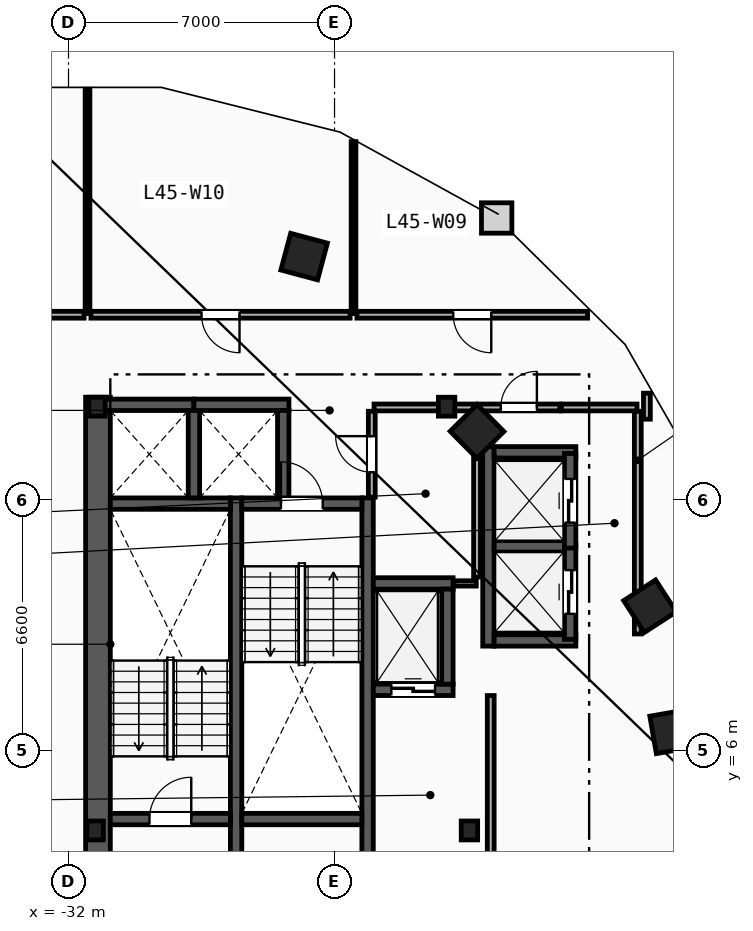
"""IFC4 building model, lengths in metres.
Left out: names, types, materials, properties, quantities, classifications, styles, units other than length and angle.
Written with IfcOpenShell. Run it as: python <this file> out.ifc"""

import sys

from ifc_helpers import new_model, si_unit, direction, frame, frame_2d, origin, origin_2d, place, context, subcontext, project, spatial, rectangle, i_section, extrude, element, fill, save


model = new_model("IFC4")
c1 = context("Model", 3, precision=1e-05, world=origin(), true_north=direction((0.0, 1.0)))
c2 = subcontext(c1, "Body", "Model", "MODEL_VIEW")
j1 = project(units=[si_unit("LENGTHUNIT", "METRE"), si_unit("PLANEANGLEUNIT", "RADIAN")], contexts=[c1])
p1 = place(None, origin())
s1 = spatial("IfcSite", under=j1, at=p1, CompositionType="ELEMENT")
p2 = place(p1, origin())
s2 = spatial("IfcBuilding", under=s1, at=p2, CompositionType="ELEMENT")
p3 = place(p2, frame((0.0, 0.0, 172.8)))
s3 = spatial("IfcBuildingStorey", under=s2, at=p3, CompositionType="ELEMENT", Elevation=172.8)
for number, where, z_axis, x_axis in (
    (1, (-31.3, 3.9, 0.0), (0.0, 0.0, 1.0), (1.0, 0.0, 0.0)),
    (2, (-21.45, 3.9, 0.0), (0.0, 0.0, 1.0), (1.0, 0.0, 0.0)),
    (3, (-22.05, 15.05, 0.0), (0.0, 0.0, 1.0), (1.0, 0.0, 0.0)),
    (4, (-31.25, 15.05, 0.0), (0.0, 0.0, 1.0), (1.0, 0.0, 0.0)),
):
    element("IfcColumn", number, at=place(p3, frame(where, z_axis=z_axis, x_axis=x_axis)), inside=s3, PredefinedType="COLUMN", context=c2, shape_type="SweptSolid", body=[
        extrude(i_section(OverallWidth=0.432, OverallDepth=0.498, WebThickness=0.056, FlangeThickness=0.089, FilletRadius=0.018, at=origin_2d()), origin(), (0.0, 0.0, 1.0), 3.6),
    ])
for number, where, z_axis, x_axis in (
    (5, (-15.55, 3.2, 0.0), (0.0, 0.0, 1.0), (0.315, 0.949, 0.0)),
    (6, (-16.125, 6.5, 0.0), (0.0, 0.0, 1.0), (-0.172, 0.985, 0.0)),
    (7, (-16.7, 9.8, 0.0), (0.0, 0.0, 1.0), (-0.544, 0.839, 0.0)),
    (8, (-21.25, 14.4, 0.0), (0.0, 0.0, 1.0), (-0.703, 0.711, 0.0)),
    (9, (-25.8, 19.0, 0.0), (0.0, 0.0, 1.0), (-0.966, 0.259, 0.0)),
):
    element("IfcColumn", number, at=place(p3, frame(where, z_axis=z_axis, x_axis=x_axis)), inside=s3, PredefinedType="COLUMN", context=c2, shape_type="SweptSolid", body=[
        extrude(rectangle(XDim=1.0, YDim=1.0, at=origin_2d()), origin(), (0.0, 0.0, 1.0), 3.6),
    ])
p4 = place(p3, frame((-31.225, 1.97, 0.0), z_axis=(0.0, 0.0, 1.0), x_axis=(0.0, 1.0, 0.0)))
e10 = element("IfcWall", 10, at=p4, inside=s3, PredefinedType="SHEAR", context=c2, shape_type="SweptSolid", body=[
    extrude(rectangle(XDim=13.33, YDim=0.65, at=frame_2d((6.665, 0.0))), origin(), (0.0, 0.0, 1.0), 3.36),
])
for number, where, z_axis, x_axis in (
    (11, (-27.59, 1.97, 0.0), (0.0, 0.0, 1.0), (0.0, 1.0, 0.0)),
    (12, (-24.13, 1.97, 0.0), (0.0, 0.0, 1.0), (0.0, 1.0, 0.0)),
):
    element("IfcWall", number, at=place(p3, frame(where, z_axis=z_axis, x_axis=x_axis)), inside=s3, PredefinedType="SHEAR", context=c2, shape_type="SweptSolid", body=[
        extrude(rectangle(XDim=10.68, YDim=0.3, at=frame_2d((5.34, 0.0))), origin(), (0.0, 0.0, 1.0), 3.36),
    ])
p5 = place(p3, frame((-30.9, 4.2, 0.0), z_axis=(0.0, 0.0, 1.0), x_axis=(1.0, 0.0, 0.0)))
e13 = element("IfcWall", 13, at=p5, inside=s3, PredefinedType="SHEAR", context=c2, shape_type="SweptSolid", body=[
    extrude(rectangle(XDim=3.16, YDim=0.3, at=frame_2d((1.58, 0.0))), origin(), (0.0, 0.0, 1.0), 3.36),
])
p6 = place(p5, frame((1.03, 0.0, 0.0)))
e14 = element("IfcOpeningElement", 14, at=p6, cuts=e13, PredefinedType="OPENING", context=c2, shape_type="SweptSolid", body=[
    extrude(rectangle(XDim=1.1, YDim=2.15, at=frame_2d((0.55, 1.075))), frame((0.0, 0.16, 0.0), z_axis=(0.0, -1.0, 0.0), x_axis=(1.0, 0.0, 0.0)), (0.0, 0.0, 1.0), 0.32),
])
p7 = place(p3, frame((-30.9, 12.5, 0.0), z_axis=(0.0, 0.0, 1.0), x_axis=(1.0, 0.0, 0.0)))
e15 = element("IfcWall", 15, at=p7, inside=s3, PredefinedType="SHEAR", context=c2, shape_type="SweptSolid", body=[
    extrude(rectangle(XDim=3.16, YDim=0.3, at=frame_2d((1.58, 0.0))), origin(), (0.0, 0.0, 1.0), 3.36),
])
p8 = place(p3, frame((-27.44, 12.5, 0.0), z_axis=(0.0, 0.0, 1.0), x_axis=(1.0, 0.0, 0.0)))
e16 = element("IfcWall", 16, at=p8, inside=s3, PredefinedType="SHEAR", context=c2, shape_type="SweptSolid", body=[
    extrude(rectangle(XDim=3.16, YDim=0.3, at=frame_2d((1.58, 0.0))), origin(), (0.0, 0.0, 1.0), 3.36),
])
p9 = place(p8, frame((1.03, 0.0, 0.0)))
e17 = element("IfcOpeningElement", 17, at=p9, cuts=e16, PredefinedType="OPENING", context=c2, shape_type="SweptSolid", body=[
    extrude(rectangle(XDim=1.1, YDim=2.15, at=frame_2d((0.55, 1.075))), frame((0.0, 0.16, 0.0), z_axis=(0.0, -1.0, 0.0), x_axis=(1.0, 0.0, 0.0)), (0.0, 0.0, 1.0), 0.32),
])
p10 = place(p3, frame((-27.44, 4.2, 0.0), z_axis=(0.0, 0.0, 1.0), x_axis=(1.0, 0.0, 0.0)))
e18 = element("IfcWall", 18, at=p10, inside=s3, PredefinedType="SHEAR", context=c2, shape_type="SweptSolid", body=[
    extrude(rectangle(XDim=3.16, YDim=0.3, at=frame_2d((1.58, 0.0))), origin(), (0.0, 0.0, 1.0), 3.36),
])
p11 = place(p3, frame((-20.89, 2.15, 0.0), z_axis=(0.0, 0.0, 1.0), x_axis=(0.0, 1.0, 0.0)))
e19 = element("IfcWall", 19, at=p11, inside=s3, PredefinedType="PARTITIONING", context=c2, shape_type="SweptSolid", body=[
    extrude(rectangle(XDim=5.3, YDim=0.18, at=frame_2d((2.65, 0.0))), origin(), (0.0, 0.0, 1.0), 3.36),
])
p12 = place(p3, frame((-23.98, 7.6, 0.0), z_axis=(0.0, 0.0, 1.0), x_axis=(1.0, 0.0, 0.0)))
e20 = element("IfcWall", 20, at=p12, inside=s3, PredefinedType="SHEAR", context=c2, shape_type="SweptSolid", body=[
    extrude(rectangle(XDim=2.1, YDim=0.3, at=frame_2d((1.05, 0.0))), origin(), (0.0, 0.0, 1.0), 3.36),
])
p13 = place(p12, frame((0.475, 0.0, 0.0)))
e21 = element("IfcOpeningElement", 21, at=p13, cuts=e20, PredefinedType="OPENING", context=c2, shape_type="SweptSolid", body=[
    extrude(rectangle(XDim=1.15, YDim=2.2, at=frame_2d((0.575, 1.1))), frame((0.0, 0.16, 0.0), z_axis=(0.0, -1.0, 0.0), x_axis=(1.0, 0.0, 0.0)), (0.0, 0.0, 1.0), 0.32),
])
p14 = place(p3, frame((-23.98, 10.4, 0.0), z_axis=(0.0, 0.0, 1.0), x_axis=(1.0, 0.0, 0.0)))
e22 = element("IfcWall", 22, at=p14, inside=s3, PredefinedType="SHEAR", context=c2, shape_type="SweptSolid", body=[
    extrude(rectangle(XDim=2.1, YDim=0.3, at=frame_2d((1.05, 0.0))), origin(), (0.0, 0.0, 1.0), 3.36),
])
for number, where, z_axis, x_axis in (
    (23, (-22.03, 7.75, 0.0), (0.0, 0.0, 1.0), (0.0, 1.0, 0.0)),
    (24, (-31.2, 15.1, 0.0), (0.0, 0.0, 1.0), (1.0, 0.0, 0.0)),
):
    element("IfcWall", number, at=place(p3, frame(where, z_axis=z_axis, x_axis=x_axis)), inside=s3, PredefinedType="SHEAR", context=c2, shape_type="SweptSolid", body=[
        extrude(rectangle(XDim=2.5, YDim=0.3, at=frame_2d((1.25, 0.0))), origin(), (0.0, 0.0, 1.0), 3.36),
    ])
p15 = place(p3, frame((-28.7, 12.65, 0.0), z_axis=(0.0, 0.0, 1.0), x_axis=(0.0, 1.0, 0.0)))
e25 = element("IfcWall", 25, at=p15, inside=s3, PredefinedType="SHEAR", context=c2, shape_type="SweptSolid", body=[
    extrude(rectangle(XDim=2.3, YDim=0.3, at=frame_2d((1.15, 0.0))), origin(), (0.0, 0.0, 1.0), 3.36),
])
p16 = place(p3, frame((-28.7, 15.1, 0.0), z_axis=(0.0, 0.0, 1.0), x_axis=(1.0, 0.0, 0.0)))
e26 = element("IfcWall", 26, at=p16, inside=s3, PredefinedType="SHEAR", context=c2, shape_type="SweptSolid", body=[
    extrude(rectangle(XDim=2.5, YDim=0.3, at=frame_2d((1.25, 0.0))), origin(), (0.0, 0.0, 1.0), 3.36),
])
p17 = place(p3, frame((-26.35, 12.65, 0.0), z_axis=(0.0, 0.0, 1.0), x_axis=(0.0, 1.0, 0.0)))
e27 = element("IfcWall", 27, at=p17, inside=s3, PredefinedType="SHEAR", context=c2, shape_type="SweptSolid", body=[
    extrude(rectangle(XDim=2.3, YDim=0.3, at=frame_2d((1.15, 0.0))), origin(), (0.0, 0.0, 1.0), 3.36),
])
p18 = place(p3, frame((-20.95, 8.75, 0.0), z_axis=(0.0, 0.0, 1.0), x_axis=(0.0, 1.0, 0.0)))
e28 = element("IfcWall", 28, at=p18, inside=s3, PredefinedType="SHEAR", context=c2, shape_type="SweptSolid", body=[
    extrude(rectangle(XDim=5.25, YDim=0.3, at=frame_2d((2.625, 0.0))), origin(), (0.0, 0.0, 1.0), 3.36),
])
for number, where, z_axis, x_axis in (
    (29, (-20.8, 8.9, 0.0), (0.0, 0.0, 1.0), (1.0, 0.0, 0.0)),
    (30, (-20.8, 13.85, 0.0), (0.0, 0.0, 1.0), (1.0, 0.0, 0.0)),
):
    element("IfcWall", number, at=place(p3, frame(where, z_axis=z_axis, x_axis=x_axis)), inside=s3, PredefinedType="SHEAR", context=c2, shape_type="SweptSolid", body=[
        extrude(rectangle(XDim=2.15, YDim=0.3, at=frame_2d((1.075, 0.0))), origin(), (0.0, 0.0, 1.0), 3.36),
    ])
p19 = place(p3, frame((-20.8, 11.375, 0.0), z_axis=(0.0, 0.0, 1.0), x_axis=(1.0, 0.0, 0.0)))
e31 = element("IfcWall", 31, at=p19, inside=s3, PredefinedType="SHEAR", context=c2, shape_type="SweptSolid", body=[
    extrude(rectangle(XDim=1.85, YDim=0.3, at=frame_2d((0.925, 0.0))), origin(), (0.0, 0.0, 1.0), 3.36),
])
p20 = place(p3, frame((-18.8, 8.93, 0.0), z_axis=(0.0, 0.0, 1.0), x_axis=(0.0, 1.0, 0.0)))
e32 = element("IfcWall", 32, at=p20, inside=s3, PredefinedType="SHEAR", context=c2, shape_type="SweptSolid", body=[
    extrude(rectangle(XDim=2.49, YDim=0.3, at=frame_2d((1.245, 0.0))), origin(), (0.0, 0.0, 1.0), 3.36),
])
p21 = place(p20, frame((0.67, 0.0, 0.0)))
e33 = element("IfcOpeningElement", 33, at=p21, cuts=e32, PredefinedType="OPENING", context=c2, shape_type="SweptSolid", body=[
    extrude(rectangle(XDim=1.15, YDim=2.2, at=frame_2d((0.575, 1.1))), frame((0.0, 0.16, 0.0), z_axis=(0.0, -1.0, 0.0), x_axis=(1.0, 0.0, 0.0)), (0.0, 0.0, 1.0), 0.32),
])
p22 = place(p3, frame((-18.8, 11.33, 0.0), z_axis=(0.0, 0.0, 1.0), x_axis=(0.0, 1.0, 0.0)))
e34 = element("IfcWall", 34, at=p22, inside=s3, PredefinedType="SHEAR", context=c2, shape_type="SweptSolid", body=[
    extrude(rectangle(XDim=2.49, YDim=0.3, at=frame_2d((1.245, 0.0))), origin(), (0.0, 0.0, 1.0), 3.36),
])
p23 = place(p22, frame((0.67, 0.0, 0.0)))
e35 = element("IfcOpeningElement", 35, at=p23, cuts=e34, PredefinedType="OPENING", context=c2, shape_type="SweptSolid", body=[
    extrude(rectangle(XDim=1.15, YDim=2.2, at=frame_2d((0.575, 1.1))), frame((0.0, 0.16, 0.0), z_axis=(0.0, -1.0, 0.0), x_axis=(1.0, 0.0, 0.0)), (0.0, 0.0, 1.0), 0.32),
])
p24 = place(p3, frame((-17.02, 9.07, 0.0), z_axis=(0.0, 0.0, 1.0), x_axis=(0.0, 1.0, 0.0)))
e36 = element("IfcWall", 36, at=p24, inside=s3, PredefinedType="PARTITIONING", context=c2, shape_type="SweptSolid", body=[
    extrude(rectangle(XDim=5.86, YDim=0.18, at=frame_2d((2.93, 0.0))), origin(), (0.0, 0.0, 1.0), 3.36),
])
p25 = place(p3, frame((-21.23, 15.03, 0.0), z_axis=(0.0, 0.0, 1.0), x_axis=(1.0, 0.0, 0.0)))
e37 = element("IfcWall", 37, at=p25, inside=s3, PredefinedType="PARTITIONING", context=c2, shape_type="SweptSolid", body=[
    extrude(rectangle(XDim=2.16, YDim=0.18, at=frame_2d((1.08, 0.0))), origin(), (0.0, 0.0, 1.0), 3.36),
])
p26 = place(p25, frame((0.605, 0.0, 0.0)))
e38 = element("IfcOpeningElement", 38, at=p26, cuts=e37, PredefinedType="OPENING", context=c2, shape_type="SweptSolid", body=[
    extrude(rectangle(XDim=0.95, YDim=2.1, at=frame_2d((0.475, 1.05))), frame((0.0, 0.1, 0.0), z_axis=(0.0, -1.0, 0.0), x_axis=(1.0, 0.0, 0.0)), (0.0, 0.0, 1.0), 0.2),
])
p27 = place(p3, frame((-19.03, 15.03, 0.0), z_axis=(0.0, 0.0, 1.0), x_axis=(1.0, 0.0, 0.0)))
e39 = element("IfcWall", 39, at=p27, inside=s3, PredefinedType="PARTITIONING", context=c2, shape_type="SweptSolid", body=[
    extrude(rectangle(XDim=1.99, YDim=0.18, at=frame_2d((0.995, 0.0))), origin(), (0.0, 0.0, 1.0), 3.36),
])
p28 = place(p3, frame((-21.86, 10.4, 0.0), z_axis=(0.0, 0.0, 1.0), x_axis=(1.0, 0.0, 0.0)))
e40 = element("IfcWall", 40, at=p28, inside=s3, PredefinedType="PARTITIONING", context=c2, shape_type="SweptSolid", body=[
    extrude(rectangle(XDim=0.59, YDim=0.14, at=frame_2d((0.295, 0.0))), origin(), (0.0, 0.0, 1.0), 3.36),
])
p29 = place(p3, frame((-21.25, 10.57, 0.0), z_axis=(0.0, 0.0, 1.0), x_axis=(0.0, 1.0, 0.0)))
e41 = element("IfcWall", 41, at=p29, inside=s3, PredefinedType="PARTITIONING", context=c2, shape_type="SweptSolid", body=[
    extrude(rectangle(XDim=4.36, YDim=0.18, at=frame_2d((2.18, 0.0))), origin(), (0.0, 0.0, 1.0), 3.36),
])
p30 = place(p3, frame((-23.96, 15.03, 0.0), z_axis=(0.0, 0.0, 1.0), x_axis=(1.0, 0.0, 0.0)))
e42 = element("IfcWall", 42, at=p30, inside=s3, PredefinedType="PARTITIONING", context=c2, shape_type="SweptSolid", body=[
    extrude(rectangle(XDim=2.61, YDim=0.18, at=frame_2d((1.305, 0.0))), origin(), (0.0, 0.0, 1.0), 2.433),
])
p31 = place(p3, frame((-24.02, 12.67, 0.0), z_axis=(0.0, 0.0, 1.0), x_axis=(0.0, 1.0, 0.0)))
e43 = element("IfcWall", 43, at=p31, inside=s3, PredefinedType="PARTITIONING", context=c2, shape_type="SweptSolid", body=[
    extrude(rectangle(XDim=2.26, YDim=0.18, at=frame_2d((1.13, 0.0))), origin(), (0.0, 0.0, 1.0), 3.36),
])
p32 = place(p31, frame((0.655, 0.0, 0.0)))
e44 = element("IfcOpeningElement", 44, at=p32, cuts=e43, PredefinedType="OPENING", context=c2, shape_type="SweptSolid", body=[
    extrude(rectangle(XDim=0.95, YDim=2.1, at=frame_2d((0.475, 1.05))), frame((0.0, 0.1, 0.0), z_axis=(0.0, -1.0, 0.0), x_axis=(1.0, 0.0, 0.0)), (0.0, 0.0, 1.0), 0.2),
])
p33 = place(p3, frame((-31.5, 17.5, 0.0), z_axis=(0.0, 0.0, 1.0), x_axis=(0.0, 1.0, 0.0)))
e45 = element("IfcWall", 45, at=p33, inside=s3, PredefinedType="PARTITIONING", context=c2, shape_type="SweptSolid", body=[
    extrude(rectangle(XDim=5.902, YDim=0.125, at=frame_2d((2.951, 0.0))), origin(), (0.0, 0.0, 1.0), 3.36),
])
p34 = place(p3, frame((-24.5, 17.5, 0.0), z_axis=(0.0, 0.0, 1.0), x_axis=(0.0, 1.0, 0.0)))
e46 = element("IfcWall", 46, at=p34, inside=s3, PredefinedType="PARTITIONING", context=c2, shape_type="SweptSolid", body=[
    extrude(rectangle(XDim=4.525, YDim=0.125, at=frame_2d((2.263, 0.0))), origin(), (0.0, 0.0, 1.0), 3.36),
])
p35 = place(p3, frame((-16.78, 14.721, 0.0), z_axis=(0.0, 0.0, 1.0), x_axis=(0.0, 1.0, 0.0)))
e47 = element("IfcWall", 47, at=p35, inside=s3, PredefinedType="PARTITIONING", context=c2, shape_type="SweptSolid", body=[
    extrude(rectangle(XDim=0.684, YDim=0.18, at=frame_2d((0.342, 0.0))), origin(), (0.0, 0.0, 1.0), 3.36),
])
p36 = place(p3, frame((-31.59, 17.47, 0.0), z_axis=(0.0, 0.0, 1.0), x_axis=(-1.0, 0.0, 0.0)))
e48 = element("IfcWall", 48, at=p36, inside=s3, PredefinedType="PARTITIONING", context=c2, shape_type="SweptSolid", body=[
    extrude(rectangle(XDim=2.038, YDim=0.18, at=frame_2d((1.019, 0.0))), origin(), (0.0, 0.0, 1.0), 3.36),
])
p37 = place(p3, frame((-18.342, 17.47, 0.0), z_axis=(0.0, 0.0, 1.0), x_axis=(-1.0, 0.0, 0.0)))
e49 = element("IfcWall", 49, at=p37, inside=s3, PredefinedType="PARTITIONING", context=c2, shape_type="SweptSolid", body=[
    extrude(rectangle(XDim=6.068, YDim=0.18, at=frame_2d((3.034, 0.0))), origin(), (0.0, 0.0, 1.0), 3.36),
])
p38 = place(p37, frame((2.534, 0.0, 0.0)))
e50 = element("IfcOpeningElement", 50, at=p38, cuts=e49, PredefinedType="OPENING", context=c2, shape_type="SweptSolid", body=[
    extrude(rectangle(XDim=1.0, YDim=2.15, at=frame_2d((0.5, 1.075))), frame((0.0, 0.1, 0.0), z_axis=(0.0, -1.0, 0.0), x_axis=(1.0, 0.0, 0.0)), (0.0, 0.0, 1.0), 0.2),
])
p39 = place(p3, frame((-24.59, 17.47, 0.0), z_axis=(0.0, 0.0, 1.0), x_axis=(-1.0, 0.0, 0.0)))
e51 = element("IfcWall", 51, at=p39, inside=s3, PredefinedType="PARTITIONING", context=c2, shape_type="SweptSolid", body=[
    extrude(rectangle(XDim=6.82, YDim=0.18, at=frame_2d((3.41, 0.0))), origin(), (0.0, 0.0, 1.0), 3.36),
])
p40 = place(p39, frame((2.91, 0.0, 0.0)))
e52 = element("IfcOpeningElement", 52, at=p40, cuts=e51, PredefinedType="OPENING", context=c2, shape_type="SweptSolid", body=[
    extrude(rectangle(XDim=1.0, YDim=2.15, at=frame_2d((0.5, 1.075))), frame((0.0, 0.1, 0.0), z_axis=(0.0, -1.0, 0.0), x_axis=(1.0, 0.0, 0.0)), (0.0, 0.0, 1.0), 0.2),
])
p41 = place(p6, origin())
e53 = element("IfcDoor", 53, at=p41, inside=s3, OperationType="SINGLE_SWING_RIGHT", PredefinedType="DOOR", context=c2, shape_type="SweptSolid", body=[
    extrude(rectangle(XDim=1.1, YDim=2.15, at=frame_2d((0.55, 1.075))), frame((0.0, 0.025, 0.0), z_axis=(0.0, -1.0, 0.0), x_axis=(1.0, 0.0, 0.0)), (0.0, 0.0, 1.0), 0.05),
])
fill(e14, e53)
p42 = place(p9, origin())
e54 = element("IfcDoor", 54, at=p42, inside=s3, OperationType="SINGLE_SWING_LEFT", PredefinedType="DOOR", context=c2, shape_type="SweptSolid", body=[
    extrude(rectangle(XDim=1.1, YDim=2.15, at=frame_2d((0.55, 1.075))), frame((0.0, 0.025, 0.0), z_axis=(0.0, -1.0, 0.0), x_axis=(1.0, 0.0, 0.0)), (0.0, 0.0, 1.0), 0.05),
])
fill(e17, e54)
p43 = place(p13, origin())
e55 = element("IfcDoor", 55, at=p43, inside=s3, OperationType="SLIDING_TO_LEFT", PredefinedType="TRAPDOOR", context=c2, shape_type="SweptSolid", body=[
    extrude(rectangle(XDim=1.15, YDim=2.2, at=frame_2d((0.575, 1.1))), frame((0.0, 0.025, 0.0), z_axis=(0.0, -1.0, 0.0), x_axis=(1.0, 0.0, 0.0)), (0.0, 0.0, 1.0), 0.05),
])
fill(e21, e55)
p44 = place(p21, origin())
e56 = element("IfcDoor", 56, at=p44, inside=s3, OperationType="SLIDING_TO_LEFT", PredefinedType="TRAPDOOR", context=c2, shape_type="SweptSolid", body=[
    extrude(rectangle(XDim=1.15, YDim=2.2, at=frame_2d((0.575, 1.1))), frame((0.0, 0.025, 0.0), z_axis=(0.0, -1.0, 0.0), x_axis=(1.0, 0.0, 0.0)), (0.0, 0.0, 1.0), 0.05),
])
fill(e33, e56)
p45 = place(p23, origin())
e57 = element("IfcDoor", 57, at=p45, inside=s3, OperationType="SLIDING_TO_LEFT", PredefinedType="TRAPDOOR", context=c2, shape_type="SweptSolid", body=[
    extrude(rectangle(XDim=1.15, YDim=2.2, at=frame_2d((0.575, 1.1))), frame((0.0, 0.025, 0.0), z_axis=(0.0, -1.0, 0.0), x_axis=(1.0, 0.0, 0.0)), (0.0, 0.0, 1.0), 0.05),
])
fill(e35, e57)
p46 = place(p40, origin())
e58 = element("IfcDoor", 58, at=p46, inside=s3, OperationType="SINGLE_SWING_LEFT", PredefinedType="DOOR", context=c2, shape_type="SweptSolid", body=[
    extrude(rectangle(XDim=1.0, YDim=2.15, at=frame_2d((0.5, 1.075))), frame((0.0, 0.025, 0.0), z_axis=(0.0, -1.0, 0.0), x_axis=(1.0, 0.0, 0.0)), (0.0, 0.0, 1.0), 0.05),
])
fill(e52, e58)
p47 = place(p38, origin())
e59 = element("IfcDoor", 59, at=p47, inside=s3, OperationType="SINGLE_SWING_LEFT", PredefinedType="DOOR", context=c2, shape_type="SweptSolid", body=[
    extrude(rectangle(XDim=1.0, YDim=2.15, at=frame_2d((0.5, 1.075))), frame((0.0, 0.025, 0.0), z_axis=(0.0, -1.0, 0.0), x_axis=(1.0, 0.0, 0.0)), (0.0, 0.0, 1.0), 0.05),
])
fill(e50, e59)
p48 = place(p32, origin())
e60 = element("IfcDoor", 60, at=p48, inside=s3, OperationType="SINGLE_SWING_RIGHT", PredefinedType="DOOR", context=c2, shape_type="SweptSolid", body=[
    extrude(rectangle(XDim=0.95, YDim=2.1, at=frame_2d((0.475, 1.05))), frame((0.0, 0.025, 0.0), z_axis=(0.0, -1.0, 0.0), x_axis=(1.0, 0.0, 0.0)), (0.0, 0.0, 1.0), 0.05),
])
fill(e44, e60)
p49 = place(p26, origin())
e61 = element("IfcDoor", 61, at=p49, inside=s3, OperationType="SINGLE_SWING_RIGHT", PredefinedType="DOOR", context=c2, shape_type="SweptSolid", body=[
    extrude(rectangle(XDim=0.95, YDim=2.1, at=frame_2d((0.475, 1.05))), frame((0.0, 0.025, 0.0), z_axis=(0.0, -1.0, 0.0), x_axis=(1.0, 0.0, 0.0)), (0.0, 0.0, 1.0), 0.05),
])
fill(e38, e61)
save(model, sys.argv[1])
